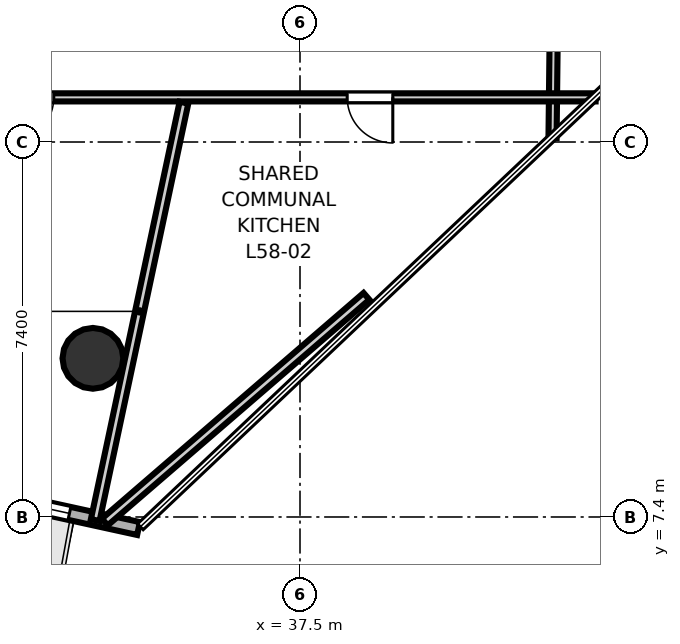
"""IFC4 building model, lengths in metres.
Left out: names, types, materials, properties, quantities, classifications, styles, units other than length and angle.
Written with IfcOpenShell. Run it as: python <this file> out.ifc"""

import sys

from ifc_helpers import new_model, si_unit, direction, frame, frame_2d, origin, origin_2d, place, context, subcontext, project, spatial, rectangle, hollow_circle, extrude, element, fill, save


model = new_model("IFC4")
c1 = context("Model", 3, precision=1e-05, world=origin(), true_north=direction((0.0, 1.0)))
c2 = subcontext(c1, "Body", "Model", "MODEL_VIEW")
j1 = project(units=[si_unit("LENGTHUNIT", "METRE"), si_unit("PLANEANGLEUNIT", "RADIAN")], contexts=[c1])
p1 = place(None, origin())
s1 = spatial("IfcSite", under=j1, at=p1, CompositionType="ELEMENT")
p2 = place(p1, origin())
s2 = spatial("IfcBuilding", under=s1, at=p2, CompositionType="ELEMENT")
p3 = place(p2, frame((0.0, 0.0, 226.2)))
s3 = spatial("IfcBuildingStorey", under=s2, at=p3, CompositionType="ELEMENT", Elevation=226.2)
p4 = place(p3, frame((33.413, 10.531, 0.0), z_axis=(0.0, 0.0, 1.0), x_axis=(1.0, 0.0, 0.0)))
e1 = element("IfcColumn", 1, at=p4, inside=s3, PredefinedType="COLUMN", context=c2, shape_type="SweptSolid", body=[
    extrude(hollow_circle(Radius=0.6, WallThickness=0.03, at=origin_2d()), origin(), (0.0, 0.0, 1.0), 3.7),
])
p5 = place(p3, frame((27.814, 8.594, 0.0), z_axis=(0.0, 0.0, 1.0), x_axis=(0.976876309586, -0.213805228583, 0.0)))
e2 = element("IfcWall", 2, at=p5, inside=s3, PredefinedType="SOLIDWALL", context=c2, shape_type="SweptSolid", body=[
    extrude(rectangle(XDim=6.653, YDim=0.26, at=frame_2d((3.326, 0.0))), origin(), (0.0, 0.0, 1.0), 3.4),
])
p6 = place(p5, frame((1.396, 0.0, 0.9)))
e3 = element("IfcOpeningElement", 3, at=p6, cuts=e2, PredefinedType="OPENING", context=c2, shape_type="SweptSolid", body=[
    extrude(rectangle(XDim=1.2, YDim=2.0, at=frame_2d((0.6, 1.0))), frame((0.0, 0.14, 0.0), z_axis=(0.0, -1.0, 0.0), x_axis=(1.0, 0.0, 0.0)), (0.0, 0.0, 1.0), 0.28),
])
p7 = place(p5, frame((4.057, 0.0, 0.9)))
e4 = element("IfcOpeningElement", 4, at=p7, cuts=e2, PredefinedType="OPENING", context=c2, shape_type="SweptSolid", body=[
    extrude(rectangle(XDim=1.2, YDim=2.0, at=frame_2d((0.6, 1.0))), frame((0.0, 0.14, 0.0), z_axis=(0.0, -1.0, 0.0), x_axis=(1.0, 0.0, 0.0)), (0.0, 0.0, 1.0), 0.28),
])
p8 = place(p3, frame((42.519, 17.98, 0.0), z_axis=(0.0, 0.0, 1.0), x_axis=(-0.011327152438, -0.999935845751, 0.0)))
e5 = element("IfcWall", 5, at=p8, inside=s3, PredefinedType="PARTITIONING", context=c2, shape_type="SweptSolid", body=[
    extrude(rectangle(XDim=3.104, YDim=0.16, at=frame_2d((1.552, 0.0))), origin(), (0.0, 0.0, 1.0), 2.72),
])
p9 = place(p3, frame((43.333, 15.681, 0.0), z_axis=(0.0, 0.0, 1.0), x_axis=(-1.0, 0.0, 0.0)))
e6 = element("IfcWall", 6, at=p9, inside=s3, PredefinedType="PARTITIONING", context=c2, shape_type="SweptSolid", body=[
    extrude(rectangle(XDim=14.933, YDim=0.16, at=frame_2d((7.467, 0.0))), origin(), (0.0, 0.0, 1.0), 2.72),
])
p10 = place(p9, frame((10.693, 0.0, 0.0)))
e7 = element("IfcOpeningElement", 7, at=p10, cuts=e6, PredefinedType="OPENING", context=c2, shape_type="SweptSolid", body=[
    extrude(rectangle(XDim=0.9, YDim=2.1, at=frame_2d((0.45, 1.05))), frame((0.0, 0.09, 0.0), z_axis=(0.0, -1.0, 0.0), x_axis=(1.0, 0.0, 0.0)), (0.0, 0.0, 1.0), 0.18),
])
p11 = place(p9, frame((4.002, 0.0, 0.0)))
e8 = element("IfcOpeningElement", 8, at=p11, cuts=e6, PredefinedType="OPENING", context=c2, shape_type="SweptSolid", body=[
    extrude(rectangle(XDim=0.9, YDim=2.1, at=frame_2d((0.45, 1.05))), frame((0.0, 0.09, 0.0), z_axis=(0.0, -1.0, 0.0), x_axis=(1.0, 0.0, 0.0)), (0.0, 0.0, 1.0), 0.18),
])
p12 = place(p3, frame((35.21, 15.576, 0.0), z_axis=(0.0, 0.0, 1.0), x_axis=(-0.207915270313, -0.978146839882, 0.0)))
e9 = element("IfcWall", 9, at=p12, inside=s3, PredefinedType="PLUMBINGWALL", context=c2, shape_type="SweptSolid", body=[
    extrude(rectangle(XDim=8.422, YDim=0.175, at=frame_2d((4.211, 0.0))), origin(), (0.0, 0.0, 1.0), 2.72),
])
p13 = place(p3, frame((38.812, 11.755, 0.0), z_axis=(0.0, 0.0, 1.0), x_axis=(-0.757241437099, -0.653135059494, 0.0)))
e10 = element("IfcWall", 10, at=p13, inside=s3, PredefinedType="PLUMBINGWALL", context=c2, shape_type="SweptSolid", body=[
    extrude(rectangle(XDim=6.82, YDim=0.175, at=frame_2d((3.41, 0.0))), origin(), (0.0, 0.0, 1.0), 2.72),
])
p14 = place(p10, origin())
e11 = element("IfcDoor", 11, at=p14, inside=s3, OperationType="SINGLE_SWING_RIGHT", PredefinedType="DOOR", context=c2, shape_type="SweptSolid", body=[
    extrude(rectangle(XDim=0.9, YDim=2.1, at=frame_2d((0.45, 1.05))), frame((0.0, 0.025, 0.0), z_axis=(0.0, -1.0, 0.0), x_axis=(1.0, 0.0, 0.0)), (0.0, 0.0, 1.0), 0.05),
])
fill(e7, e11)
p15 = place(p11, origin())
e12 = element("IfcDoor", 12, at=p15, inside=s3, OperationType="SINGLE_SWING_LEFT", PredefinedType="DOOR", context=c2, shape_type="SweptSolid", body=[
    extrude(rectangle(XDim=0.9, YDim=2.1, at=frame_2d((0.45, 1.05))), frame((0.0, 0.025, 0.0), z_axis=(0.0, -1.0, 0.0), x_axis=(1.0, 0.0, 0.0)), (0.0, 0.0, 1.0), 0.05),
])
fill(e8, e12)
p16 = place(p7, origin())
e13 = element("IfcWindow", 13, at=p16, inside=s3, PartitioningType="SINGLE_PANEL", PredefinedType="WINDOW", context=c2, shape_type="SweptSolid", body=[
    extrude(rectangle(XDim=1.2, YDim=2.0, at=frame_2d((0.6, 1.0))), frame((0.0, 0.03, 0.0), z_axis=(0.0, -1.0, 0.0), x_axis=(1.0, 0.0, 0.0)), (0.0, 0.0, 1.0), 0.06),
])
fill(e4, e13)
save(model, sys.argv[1])
